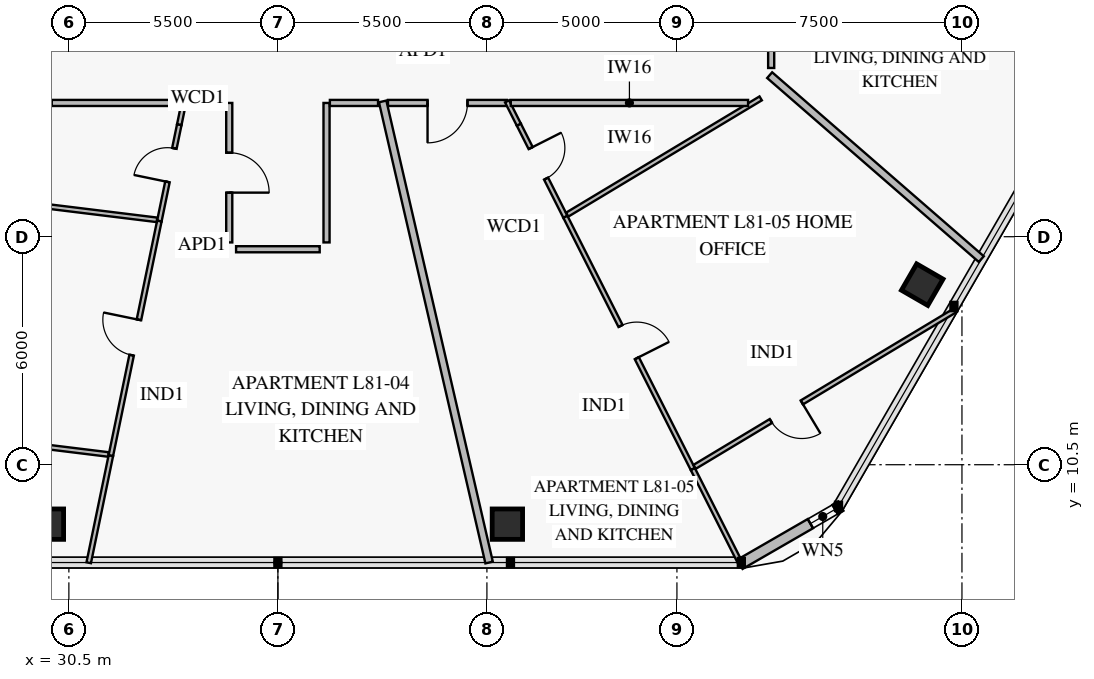
"""IFC4 building model, lengths in metres.
Left out: names, types, materials, properties, quantities, classifications, styles, units other than length and angle.
Written with IfcOpenShell. Run it as: python <this file> out.ifc"""

import sys

from ifc_helpers import new_model, si_unit, direction, frame, frame_2d, origin, origin_2d, place, context, subcontext, project, spatial, rectangle, extrude, element, fill, save


model = new_model("IFC4")
c1 = context("Model", 3, precision=1e-05, world=origin(), true_north=direction((0.0, 1.0)))
c2 = subcontext(c1, "Body", "Model", "MODEL_VIEW")
j1 = project(units=[si_unit("LENGTHUNIT", "METRE"), si_unit("PLANEANGLEUNIT", "RADIAN")], contexts=[c1])
p1 = place(None, origin())
s1 = spatial("IfcSite", under=j1, at=p1, CompositionType="ELEMENT")
p2 = place(p1, origin())
s2 = spatial("IfcBuilding", under=s1, at=p2, CompositionType="ELEMENT")
p3 = place(p2, frame((0.0, 0.0, 319.6)))
s3 = spatial("IfcBuildingStorey", under=s2, at=p3, CompositionType="ELEMENT", Elevation=319.6)
for number, where, z_axis, x_axis in (
    (1, (29.961, 8.936, 0.0), (0.0, 0.0, 1.0), (1.0, 0.0, 0.0)),
    (2, (42.039, 8.936, 0.0), (0.0, 0.0, 1.0), (1.0, 0.0, 0.0)),
    (3, (52.955, 15.238, 0.0), (0.0, 0.0, 1.0), (0.5, 0.866, 0.0)),
):
    element("IfcColumn", number, at=place(p3, frame(where, z_axis=z_axis, x_axis=x_axis)), inside=s3, PredefinedType="COLUMN", context=c2, shape_type="SweptSolid", body=[
        extrude(rectangle(XDim=0.8, YDim=0.8, at=origin_2d()), origin(), (0.0, 0.0, 1.0), 3.55),
    ])
p4 = place(p3, frame((50.811, 9.411, 0.0), z_axis=(0.0, 0.0, 1.0), x_axis=(-0.866023752521, -0.50000286006, 0.0)))
e4 = element("IfcWall", 4, at=p4, inside=s3, PredefinedType="SOLIDWALL", context=c2, shape_type="SweptSolid", body=[
    extrude(rectangle(XDim=3.065, YDim=0.28, at=frame_2d((1.532, 0.0))), origin(), (0.0, 0.0, 1.0), 3.55),
])
p5 = place(p4, frame((0.173, 0.0, 0.85)))
e5 = element("IfcOpeningElement", 5, at=p5, cuts=e4, PredefinedType="OPENING", context=c2, shape_type="SweptSolid", body=[
    extrude(rectangle(XDim=0.75, YDim=1.5, at=frame_2d((0.375, 0.75))), frame((0.0, 0.152, 0.0), z_axis=(0.0, -1.0, 0.0), x_axis=(1.0, 0.0, 0.0)), (0.0, 0.0, 1.0), 0.304),
])
p6 = place(p3, frame((33.406, 19.45, 0.0), z_axis=(0.0, 0.0, 1.0), x_axis=(-0.202468586372, -0.979288757993, 0.0)))
e6 = element("IfcWall", 6, at=p6, inside=s3, PredefinedType="PARTITIONING", context=c2, shape_type="SweptSolid", body=[
    extrude(rectangle(XDim=2.593, YDim=0.12, at=frame_2d((1.296, 0.0))), origin(), (0.0, 0.0, 1.0), 3.55),
])
p7 = place(p6, frame((0.639, 0.0, 0.0)))
e7 = element("IfcOpeningElement", 7, at=p7, cuts=e6, PredefinedType="OPENING", context=c2, shape_type="SweptSolid", body=[
    extrude(rectangle(XDim=0.9, YDim=2.1, at=frame_2d((0.45, 1.05))), frame((0.0, 0.072, 0.0), z_axis=(0.0, -1.0, 0.0), x_axis=(1.0, 0.0, 0.0)), (0.0, 0.0, 1.0), 0.144),
])
p8 = place(p3, frame((32.881, 16.911, 0.0), z_axis=(0.0, 0.0, 1.0), x_axis=(-0.202463483785, -0.979289812943, 0.0)))
e8 = element("IfcWall", 8, at=p8, inside=s3, PredefinedType="PARTITIONING", context=c2, shape_type="SweptSolid", body=[
    extrude(rectangle(XDim=6.305, YDim=0.12, at=frame_2d((3.153, 0.0))), origin(), (0.0, 0.0, 1.0), 3.2),
])
p9 = place(p8, frame((2.653, 0.0, 0.0)))
e9 = element("IfcOpeningElement", 9, at=p9, cuts=e8, PredefinedType="OPENING", context=c2, shape_type="SweptSolid", body=[
    extrude(rectangle(XDim=0.95, YDim=2.1, at=frame_2d((0.475, 1.05))), frame((0.0, 0.072, 0.0), z_axis=(0.0, -1.0, 0.0), x_axis=(1.0, 0.0, 0.0)), (0.0, 0.0, 1.0), 0.144),
])
p10 = place(p3, frame((25.663, 11.491, 0.0), z_axis=(0.0, 0.0, 1.0), x_axis=(0.992544417597, -0.121883465234, 0.0)))
e10 = element("IfcWall", 10, at=p10, inside=s3, PredefinedType="PARTITIONING", context=c2, shape_type="SweptSolid", body=[
    extrude(rectangle(XDim=5.923, YDim=0.12, at=frame_2d((2.961, 0.0))), origin(), (0.0, 0.0, 1.0), 2.97),
])
p11 = place(p10, frame((2.571, 0.0, 0.0)))
e11 = element("IfcOpeningElement", 11, at=p11, cuts=e10, PredefinedType="OPENING", context=c2, shape_type="SweptSolid", body=[
    extrude(rectangle(XDim=0.95, YDim=2.1, at=frame_2d((0.475, 1.05))), frame((0.0, 0.072, 0.0), z_axis=(0.0, -1.0, 0.0), x_axis=(1.0, 0.0, 0.0)), (0.0, 0.0, 1.0), 0.144),
])
p12 = place(p3, frame((34.72, 20.02, 0.0), z_axis=(0.0, 0.0, 1.0), x_axis=(0.0, -1.0, 0.0)))
e12 = element("IfcWall", 12, at=p12, inside=s3, PredefinedType="PARTITIONING", context=c2, shape_type="SweptSolid", body=[
    extrude(rectangle(XDim=3.67, YDim=0.16, at=frame_2d((1.835, 0.0))), origin(), (0.0, 0.0, 1.0), 3.55),
])
p13 = place(p12, frame((1.31, 0.0, 0.0)))
e13 = element("IfcOpeningElement", 13, at=p13, cuts=e12, PredefinedType="OPENING", context=c2, shape_type="SweptSolid", body=[
    extrude(rectangle(XDim=1.05, YDim=2.15, at=frame_2d((0.525, 1.075))), frame((0.0, 0.092, 0.0), z_axis=(0.0, -1.0, 0.0), x_axis=(1.0, 0.0, 0.0)), (0.0, 0.0, 1.0), 0.184),
])
p14 = place(p3, frame((42.34, 19.45, 0.0), z_axis=(0.0, 0.0, 1.0), x_axis=(0.45083817538, -0.892605702211, 0.0)))
e14 = element("IfcWall", 14, at=p14, inside=s3, PredefinedType="PARTITIONING", context=c2, shape_type="SweptSolid", body=[
    extrude(rectangle(XDim=2.719, YDim=0.12, at=frame_2d((1.359, 0.0))), origin(), (0.0, 0.0, 1.0), 3.55),
])
p15 = place(p14, frame((0.692, 0.0, 0.0)))
e15 = element("IfcOpeningElement", 15, at=p15, cuts=e14, PredefinedType="OPENING", context=c2, shape_type="SweptSolid", body=[
    extrude(rectangle(XDim=0.9, YDim=2.1, at=frame_2d((0.45, 1.05))), frame((0.0, 0.072, 0.0), z_axis=(0.0, -1.0, 0.0), x_axis=(1.0, 0.0, 0.0)), (0.0, 0.0, 1.0), 0.144),
])
p16 = place(p3, frame((43.565, 17.023, 0.0), z_axis=(0.0, 0.0, 1.0), x_axis=(0.450887042269, -0.892581018796, 0.0)))
e16 = element("IfcWall", 16, at=p16, inside=s3, PredefinedType="PARTITIONING", context=c2, shape_type="SweptSolid", body=[
    extrude(rectangle(XDim=7.436, YDim=0.12, at=frame_2d((3.718, 0.0))), origin(), (0.0, 0.0, 1.0), 2.97),
])
p17 = place(p16, frame((3.218, 0.0, 0.0)))
e17 = element("IfcOpeningElement", 17, at=p17, cuts=e16, PredefinedType="OPENING", context=c2, shape_type="SweptSolid", body=[
    extrude(rectangle(XDim=0.95, YDim=2.1, at=frame_2d((0.475, 1.05))), frame((0.0, 0.072, 0.0), z_axis=(0.0, -1.0, 0.0), x_axis=(1.0, 0.0, 0.0)), (0.0, 0.0, 1.0), 0.144),
])
p18 = place(p3, frame((46.965, 10.444, 0.0), z_axis=(0.0, 0.0, 1.0), x_axis=(0.857167053884, 0.515038485683, 0.0)))
e18 = element("IfcWall", 18, at=p18, inside=s3, PredefinedType="PARTITIONING", context=c2, shape_type="SweptSolid", body=[
    extrude(rectangle(XDim=8.003, YDim=0.12, at=frame_2d((4.001, 0.0))), origin(), (0.0, 0.0, 1.0), 3.122),
])
p19 = place(p18, frame((2.342, 0.0, 0.0)))
e19 = element("IfcOpeningElement", 19, at=p19, cuts=e18, PredefinedType="OPENING", context=c2, shape_type="SweptSolid", body=[
    extrude(rectangle(XDim=0.95, YDim=2.1, at=frame_2d((0.475, 1.05))), frame((0.0, 0.072, 0.0), z_axis=(0.0, -1.0, 0.0), x_axis=(1.0, 0.0, 0.0)), (0.0, 0.0, 1.0), 0.144),
])
p20 = place(p3, frame((38.897, 20.02, 0.0), z_axis=(0.0, 0.0, 1.0), x_axis=(1.0, 0.0, 0.0)))
e20 = element("IfcWall", 20, at=p20, inside=s3, PredefinedType="PARTITIONING", context=c2, shape_type="SweptSolid", body=[
    extrude(rectangle(XDim=3.132, YDim=0.16, at=frame_2d((1.566, 0.0))), origin(), (0.0, 0.0, 1.0), 3.0),
])
p21 = place(p20, frame((1.041, 0.0, 0.0)))
e21 = element("IfcOpeningElement", 21, at=p21, cuts=e20, PredefinedType="OPENING", context=c2, shape_type="SweptSolid", body=[
    extrude(rectangle(XDim=1.05, YDim=2.15, at=frame_2d((0.525, 1.075))), frame((0.0, 0.092, 0.0), z_axis=(0.0, -1.0, 0.0), x_axis=(1.0, 0.0, 0.0)), (0.0, 0.0, 1.0), 0.184),
])
p22 = place(p3, frame((33.533, 20.064, 0.0), z_axis=(0.0, 0.0, 1.0), x_axis=(-0.202695657212, -0.979241783498, 0.0)))
e22 = element("IfcWall", 22, at=p22, inside=s3, PredefinedType="PARTITIONING", context=c2, shape_type="SweptSolid", body=[
    extrude(rectangle(XDim=0.627, YDim=0.12, at=frame_2d((0.314, 0.0))), origin(), (0.0, 0.0, 1.0), 3.55),
])
p23 = place(p3, frame((31.604, 10.736, 0.0), z_axis=(0.0, 0.0, 1.0), x_axis=(-0.202448350059, -0.979292941646, 0.0)))
e23 = element("IfcWall", 23, at=p23, inside=s3, PredefinedType="PARTITIONING", context=c2, shape_type="SweptSolid", body=[
    extrude(rectangle(XDim=2.875, YDim=0.12, at=frame_2d((1.438, 0.0))), origin(), (0.0, 0.0, 1.0), 2.97),
])
p24 = place(p3, frame((28.707, 17.449, 0.0), z_axis=(0.0, 0.0, 1.0), x_axis=(0.992543079952, -0.121894357702, 0.0)))
e24 = element("IfcWall", 24, at=p24, inside=s3, PredefinedType="PARTITIONING", context=c2, shape_type="SweptSolid", body=[
    extrude(rectangle(XDim=4.142, YDim=0.12, at=frame_2d((2.071, 0.0))), origin(), (0.0, 0.0, 1.0), 3.0),
])
p25 = place(p3, frame((38.757, 20.06, 0.0), z_axis=(0.0, 0.0, 1.0), x_axis=(0.224939685303, -0.974372689465, 0.0)))
e25 = element("IfcWall", 25, at=p25, inside=s3, PredefinedType="PARTITIONING", context=c2, shape_type="SweptSolid", body=[
    extrude(rectangle(XDim=12.453, YDim=0.2, at=frame_2d((6.227, 0.0))), origin(), (0.0, 0.0, 1.0), 2.97),
])
p26 = place(p3, frame((42.03, 20.062, 0.0), z_axis=(0.0, 0.0, 1.0), x_axis=(0.450911009137, -0.892568911535, 0.0)))
e26 = element("IfcWall", 26, at=p26, inside=s3, PredefinedType="PARTITIONING", context=c2, shape_type="SweptSolid", body=[
    extrude(rectangle(XDim=0.686, YDim=0.12, at=frame_2d((0.343, 0.0))), origin(), (0.0, 0.0, 1.0), 3.55),
])
p27 = place(p3, frame((46.918, 10.386, 0.0), z_axis=(0.0, 0.0, 1.0), x_axis=(0.450886917931, -0.892581081605, 0.0)))
e27 = element("IfcWall", 27, at=p27, inside=s3, PredefinedType="PARTITIONING", context=c2, shape_type="SweptSolid", body=[
    extrude(rectangle(XDim=2.762, YDim=0.12, at=frame_2d((1.381, 0.0))), origin(), (0.0, 0.0, 1.0), 3.55),
])
p28 = place(p3, frame((43.612, 17.081, 0.0), z_axis=(0.0, 0.0, 1.0), x_axis=(0.857173603687, 0.515027584837, 0.0)))
e28 = element("IfcWall", 28, at=p28, inside=s3, PredefinedType="PARTITIONING", context=c2, shape_type="SweptSolid", body=[
    extrude(rectangle(XDim=5.94, YDim=0.12, at=frame_2d((2.97, 0.0))), origin(), (0.0, 0.0, 1.0), 3.0),
])
p29 = place(p3, frame((48.94, 20.751, 0.0), z_axis=(0.0, 0.0, 1.0), x_axis=(0.754714491072, -0.656053379662, 0.0)))
e29 = element("IfcWall", 29, at=p29, inside=s3, PredefinedType="PARTITIONING", context=c2, shape_type="SweptSolid", body=[
    extrude(rectangle(XDim=7.379, YDim=0.2, at=frame_2d((3.689, 0.0))), origin(), (0.0, 0.0, 1.0), 2.97),
])
p30 = place(p3, frame((37.28, 16.35, 0.0), z_axis=(0.0, 0.0, 1.0), x_axis=(0.0, 1.0, 0.0)))
e30 = element("IfcWall", 30, at=p30, inside=s3, PredefinedType="PARTITIONING", context=c2, shape_type="SweptSolid", body=[
    extrude(rectangle(XDim=3.67, YDim=0.16, at=frame_2d((1.835, 0.0))), origin(), (0.0, 0.0, 1.0), 3.55),
])
p31 = place(p3, frame((34.9, 16.17, 0.0), z_axis=(0.0, 0.0, 1.0), x_axis=(1.0, 0.0, 0.0)))
e31 = element("IfcWall", 31, at=p31, inside=s3, PredefinedType="PARTITIONING", context=c2, shape_type="SweptSolid", body=[
    extrude(rectangle(XDim=2.2, YDim=0.16, at=frame_2d((1.1, 0.0))), origin(), (0.0, 0.0, 1.0), 3.55),
])
p32 = place(p3, frame((37.368, 20.02, 0.0), z_axis=(0.0, 0.0, 1.0), x_axis=(1.0, 0.0, 0.0)))
e32 = element("IfcWall", 32, at=p32, inside=s3, PredefinedType="PARTITIONING", context=c2, shape_type="SweptSolid", body=[
    extrude(rectangle(XDim=1.268, YDim=0.16, at=frame_2d((0.634, 0.0))), origin(), (0.0, 0.0, 1.0), 3.55),
])
p33 = place(p3, frame((33.593, 20.02, 0.0), z_axis=(0.0, 0.0, 1.0), x_axis=(1.0, 0.0, 0.0)))
e33 = element("IfcWall", 33, at=p33, inside=s3, PredefinedType="PARTITIONING", context=c2, shape_type="SweptSolid", body=[
    extrude(rectangle(XDim=1.039, YDim=0.16, at=frame_2d((0.52, 0.0))), origin(), (0.0, 0.0, 1.0), 3.55),
])
p34 = place(p3, frame((30.049, 20.02, 0.0), z_axis=(0.0, 0.0, 1.0), x_axis=(1.0, 0.0, 0.0)))
e34 = element("IfcWall", 34, at=p34, inside=s3, PredefinedType="PARTITIONING", context=c2, shape_type="SweptSolid", body=[
    extrude(rectangle(XDim=3.405, YDim=0.16, at=frame_2d((1.702, 0.0))), origin(), (0.0, 0.0, 1.0), 3.0),
])
p35 = place(p3, frame((42.128, 20.02, 0.0), z_axis=(0.0, 0.0, 1.0), x_axis=(1.0, 0.0, 0.0)))
e35 = element("IfcWall", 35, at=p35, inside=s3, PredefinedType="PARTITIONING", context=c2, shape_type="SweptSolid", body=[
    extrude(rectangle(XDim=6.244, YDim=0.16, at=frame_2d((3.122, 0.0))), origin(), (0.0, 0.0, 1.0), 3.0),
])
p36 = place(p3, frame((48.98, 20.94, 0.0), z_axis=(0.0, 0.0, 1.0), x_axis=(0.0, 1.0, 0.0)))
e36 = element("IfcWall", 36, at=p36, inside=s3, PredefinedType="PARTITIONING", context=c2, shape_type="SweptSolid", body=[
    extrude(rectangle(XDim=1.31, YDim=0.16, at=frame_2d((0.655, 0.0))), origin(), (0.0, 0.0, 1.0), 3.55),
])
p37 = place(p5, origin())
e37 = element("IfcWindow", 37, at=p37, inside=s3, PartitioningType="SINGLE_PANEL", PredefinedType="WINDOW", context=c2, shape_type="SweptSolid", body=[
    extrude(rectangle(XDim=0.75, YDim=1.5, at=frame_2d((0.375, 0.75))), frame((0.0, 0.03, 0.0), z_axis=(0.0, -1.0, 0.0), x_axis=(1.0, 0.0, 0.0)), (0.0, 0.0, 1.0), 0.06),
])
fill(e5, e37)
p38 = place(p7, frame((0.9, 0.0, 0.0), z_axis=(0.0, 0.0, 1.0), x_axis=(-1.0, 0.0, 0.0)))
e38 = element("IfcDoor", 38, at=p38, inside=s3, OperationType="SINGLE_SWING_LEFT", PredefinedType="DOOR", context=c2, shape_type="SweptSolid", body=[
    extrude(rectangle(XDim=0.9, YDim=2.1, at=frame_2d((0.45, 1.05))), frame((0.0, 0.025, 0.0), z_axis=(0.0, -1.0, 0.0), x_axis=(1.0, 0.0, 0.0)), (0.0, 0.0, 1.0), 0.05),
])
fill(e7, e38)
p39 = place(p9, frame((0.95, 0.0, 0.0), z_axis=(0.0, 0.0, 1.0), x_axis=(-1.0, 0.0, 0.0)))
e39 = element("IfcDoor", 39, at=p39, inside=s3, OperationType="SINGLE_SWING_RIGHT", PredefinedType="DOOR", context=c2, shape_type="SweptSolid", body=[
    extrude(rectangle(XDim=0.95, YDim=2.1, at=frame_2d((0.475, 1.05))), frame((0.0, 0.025, 0.0), z_axis=(0.0, -1.0, 0.0), x_axis=(1.0, 0.0, 0.0)), (0.0, 0.0, 1.0), 0.05),
])
fill(e9, e39)
p40 = place(p13, origin())
e40 = element("IfcDoor", 40, at=p40, inside=s3, OperationType="SINGLE_SWING_RIGHT", PredefinedType="DOOR", context=c2, shape_type="SweptSolid", body=[
    extrude(rectangle(XDim=1.05, YDim=2.15, at=frame_2d((0.525, 1.075))), frame((0.0, 0.025, 0.0), z_axis=(0.0, -1.0, 0.0), x_axis=(1.0, 0.0, 0.0)), (0.0, 0.0, 1.0), 0.05),
])
fill(e13, e40)
p41 = place(p15, origin())
e41 = element("IfcDoor", 41, at=p41, inside=s3, OperationType="SINGLE_SWING_LEFT", PredefinedType="DOOR", context=c2, shape_type="SweptSolid", body=[
    extrude(rectangle(XDim=0.9, YDim=2.1, at=frame_2d((0.45, 1.05))), frame((0.0, 0.025, 0.0), z_axis=(0.0, -1.0, 0.0), x_axis=(1.0, 0.0, 0.0)), (0.0, 0.0, 1.0), 0.05),
])
fill(e15, e41)
p42 = place(p17, origin())
e42 = element("IfcDoor", 42, at=p42, inside=s3, OperationType="SINGLE_SWING_RIGHT", PredefinedType="DOOR", context=c2, shape_type="SweptSolid", body=[
    extrude(rectangle(XDim=0.95, YDim=2.1, at=frame_2d((0.475, 1.05))), frame((0.0, 0.025, 0.0), z_axis=(0.0, -1.0, 0.0), x_axis=(1.0, 0.0, 0.0)), (0.0, 0.0, 1.0), 0.05),
])
fill(e17, e42)
p43 = place(p19, frame((0.95, 0.0, 0.0), z_axis=(0.0, 0.0, 1.0), x_axis=(-1.0, 0.0, 0.0)))
e43 = element("IfcDoor", 43, at=p43, inside=s3, OperationType="SINGLE_SWING_LEFT", PredefinedType="DOOR", context=c2, shape_type="SweptSolid", body=[
    extrude(rectangle(XDim=0.95, YDim=2.1, at=frame_2d((0.475, 1.05))), frame((0.0, 0.025, 0.0), z_axis=(0.0, -1.0, 0.0), x_axis=(1.0, 0.0, 0.0)), (0.0, 0.0, 1.0), 0.05),
])
fill(e19, e43)
p44 = place(p21, frame((1.05, 0.0, 0.0), z_axis=(0.0, 0.0, 1.0), x_axis=(-1.0, 0.0, 0.0)))
e44 = element("IfcDoor", 44, at=p44, inside=s3, OperationType="SINGLE_SWING_RIGHT", PredefinedType="DOOR", context=c2, shape_type="SweptSolid", body=[
    extrude(rectangle(XDim=1.05, YDim=2.15, at=frame_2d((0.525, 1.075))), frame((0.0, 0.025, 0.0), z_axis=(0.0, -1.0, 0.0), x_axis=(1.0, 0.0, 0.0)), (0.0, 0.0, 1.0), 0.05),
])
fill(e21, e44)
save(model, sys.argv[1])
